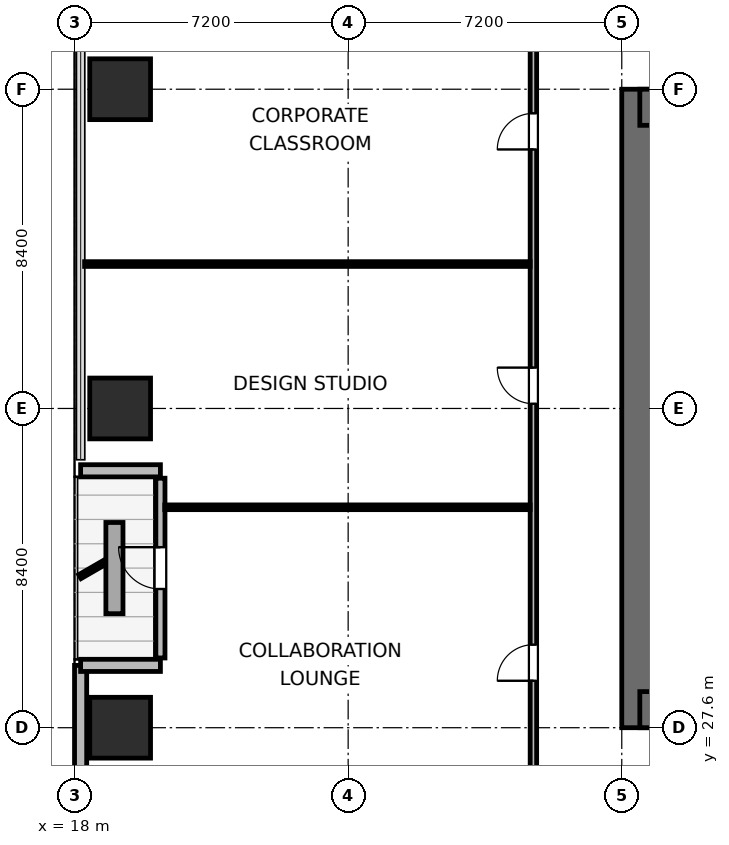
"""IFC4 building model, lengths in metres.
Left out: names, types, materials, properties, quantities, classifications, styles, units other than length and angle.
Written with IfcOpenShell. Run it as: python <this file> out.ifc"""

import sys

from ifc_helpers import new_model, si_unit, direction, frame, frame_2d, origin, origin_2d, place, context, subcontext, project, spatial, rectangle, extrude, element, fill, save


model = new_model("IFC4")
c1 = context("Model", 3, precision=1e-05, world=origin(), true_north=direction((0.0, 1.0)))
c2 = subcontext(c1, "Body", "Model", "MODEL_VIEW")
j1 = project(units=[si_unit("LENGTHUNIT", "METRE"), si_unit("PLANEANGLEUNIT", "RADIAN")], contexts=[c1])
p1 = place(None, origin())
s1 = spatial("IfcSite", under=j1, at=p1, CompositionType="ELEMENT")
p2 = place(p1, origin())
s2 = spatial("IfcBuilding", under=s1, at=p2, CompositionType="ELEMENT")
p3 = place(p2, frame((0.0, 0.0, 68.4)))
s3 = spatial("IfcBuildingStorey", under=s2, at=p3, CompositionType="ELEMENT", Elevation=68.4)
p4 = place(p3, frame((32.875, 27.6, 0.0), z_axis=(0.0, 0.0, 1.0), x_axis=(0.0, 1.0, 0.0)))
e1 = element("IfcWall", 1, at=p4, inside=s3, PredefinedType="SHEAR", context=c2, shape_type="SweptSolid", body=[
    extrude(rectangle(XDim=16.8, YDim=0.95, at=frame_2d((8.4, 0.0))), origin(), (0.0, 0.0, 1.0), 4.5),
])
p5 = place(p3, frame((32.875, 28.075, 0.0), z_axis=(0.0, 0.0, 1.0), x_axis=(1.0, 0.0, 0.0)))
e2 = element("IfcWall", 2, at=p5, inside=s3, PredefinedType="SHEAR", context=c2, shape_type="SweptSolid", body=[
    extrude(rectangle(XDim=9.05, YDim=0.95, at=frame_2d((4.525, 0.0))), origin(), (0.0, 0.0, 1.0), 4.5),
])
p6 = place(p5, frame((4.975, 0.0, 0.0)))
e3 = element("IfcOpeningElement", 3, at=p6, cuts=e2, PredefinedType="OPENING", context=c2, shape_type="SweptSolid", body=[
    extrude(rectangle(XDim=1.05, YDim=2.04, at=frame_2d((0.525, 1.02))), frame((0.0, 0.485, 0.0), z_axis=(0.0, -1.0, 0.0), x_axis=(1.0, 0.0, 0.0)), (0.0, 0.0, 1.0), 0.97),
])
p7 = place(p3, frame((32.875, 43.925, 0.0), z_axis=(0.0, 0.0, 1.0), x_axis=(1.0, 0.0, 0.0)))
e4 = element("IfcWall", 4, at=p7, inside=s3, PredefinedType="SHEAR", context=c2, shape_type="SweptSolid", body=[
    extrude(rectangle(XDim=9.05, YDim=0.95, at=frame_2d((4.525, 0.0))), origin(), (0.0, 0.0, 1.0), 4.5),
])
p8 = place(p7, frame((0.975, 0.0, 0.0)))
e5 = element("IfcOpeningElement", 5, at=p8, cuts=e4, PredefinedType="OPENING", context=c2, shape_type="SweptSolid", body=[
    extrude(rectangle(XDim=0.95, YDim=2.04, at=frame_2d((0.475, 1.02))), frame((0.0, 0.485, 0.0), z_axis=(0.0, -1.0, 0.0), x_axis=(1.0, 0.0, 0.0)), (0.0, 0.0, 1.0), 0.97),
])
p9 = place(p7, frame((4.225, 0.0, 0.0)))
e6 = element("IfcOpeningElement", 6, at=p9, cuts=e4, PredefinedType="OPENING", context=c2, shape_type="SweptSolid", body=[
    extrude(rectangle(XDim=0.9, YDim=2.02, at=frame_2d((0.45, 1.01))), frame((0.0, 0.485, 0.0), z_axis=(0.0, -1.0, 0.0), x_axis=(1.0, 0.0, 0.0)), (0.0, 0.0, 1.0), 0.97),
])
p10 = place(p7, frame((7.125, 0.0, 0.0)))
e7 = element("IfcOpeningElement", 7, at=p10, cuts=e4, PredefinedType="OPENING", context=c2, shape_type="SweptSolid", body=[
    extrude(rectangle(XDim=0.9, YDim=2.02, at=frame_2d((0.45, 1.01))), frame((0.0, 0.485, 0.0), z_axis=(0.0, -1.0, 0.0), x_axis=(1.0, 0.0, 0.0)), (0.0, 0.0, 1.0), 0.97),
])
for number, where, z_axis, x_axis in (
    (8, (19.2, 27.6, 0.0), (0.0, 0.0, 1.0), (1.0, 0.0, 0.0)),
    (9, (19.2, 36.0, 0.0), (0.0, 0.0, 1.0), (1.0, 0.0, 0.0)),
    (10, (19.2, 44.4, 0.0), (0.0, 0.0, 1.0), (1.0, 0.0, 0.0)),
):
    element("IfcColumn", number, at=place(p3, frame(where, z_axis=z_axis, x_axis=x_axis)), inside=s3, PredefinedType="COLUMN", context=c2, shape_type="SweptSolid", body=[
        extrude(rectangle(XDim=1.6, YDim=1.6, at=origin_2d()), origin(), (0.0, 0.0, 1.0), 4.5),
    ])
p11 = place(p3, frame((18.16, 15.021, 0.0), z_axis=(0.0, 0.0, 1.0), x_axis=(0.0, 1.0, 0.0)))
e11 = element("IfcWall", 11, at=p11, inside=s3, PredefinedType="SOLIDWALL", context=c2, shape_type="SweptSolid", body=[
    extrude(rectangle(XDim=14.219, YDim=0.32, at=frame_2d((7.109, 0.0))), origin(), (0.0, 0.0, 1.0), 4.24),
])
p12 = place(p3, frame((18.16, 29.24, 0.0), z_axis=(0.0, 0.0, 1.0), x_axis=(1.0, 0.0, 0.0)))
e12 = element("IfcWall", 12, at=p12, inside=s3, PredefinedType="SOLIDWALL", context=c2, shape_type="SweptSolid", body=[
    extrude(rectangle(XDim=2.1, YDim=0.32, at=frame_2d((1.05, 0.0))), origin(), (0.0, 0.0, 1.0), 3.475),
])
p13 = place(p3, frame((20.26, 29.435, 0.0), z_axis=(0.0, 0.0, 1.0), x_axis=(0.0, 1.0, 0.0)))
e13 = element("IfcWall", 13, at=p13, inside=s3, PredefinedType="SOLIDWALL", context=c2, shape_type="SweptSolid", body=[
    extrude(rectangle(XDim=4.73, YDim=0.24, at=frame_2d((2.365, 0.0))), origin(), (0.0, 0.0, 1.0), 3.762),
])
p14 = place(p13, frame((1.815, 0.0, 0.0)))
e14 = element("IfcOpeningElement", 14, at=p14, cuts=e13, PredefinedType="OPENING", context=c2, shape_type="SweptSolid", body=[
    extrude(rectangle(XDim=1.1, YDim=2.04, at=frame_2d((0.55, 1.02))), frame((0.0, 0.13, 0.0), z_axis=(0.0, -1.0, 0.0), x_axis=(1.0, 0.0, 0.0)), (0.0, 0.0, 1.0), 0.26),
])
p15 = place(p3, frame((20.26, 34.36, 0.0), z_axis=(0.0, 0.0, 1.0), x_axis=(-1.0, 0.0, 0.0)))
e15 = element("IfcWall", 15, at=p15, inside=s3, PredefinedType="SOLIDWALL", context=c2, shape_type="SweptSolid", body=[
    extrude(rectangle(XDim=2.1, YDim=0.32, at=frame_2d((1.05, 0.0))), origin(), (0.0, 0.0, 1.0), 3.475),
])
p16 = place(p3, frame((30.075, 25.307, 0.0), z_axis=(0.0, 0.0, 1.0), x_axis=(0.0, 1.0, 0.0)))
e16 = element("IfcWall", 16, at=p16, inside=s3, PredefinedType="PARTITIONING", context=c2, shape_type="SweptSolid", body=[
    extrude(rectangle(XDim=21.386, YDim=0.17, at=frame_2d((10.693, 0.0))), origin(), (0.0, 0.0, 1.0), 4.24),
])
p17 = place(p16, frame((3.528, 0.0, 0.0)))
e17 = element("IfcOpeningElement", 17, at=p17, cuts=e16, PredefinedType="OPENING", context=c2, shape_type="SweptSolid", body=[
    extrude(rectangle(XDim=0.95, YDim=2.04, at=frame_2d((0.475, 1.02))), frame((0.0, 0.095, 0.0), z_axis=(0.0, -1.0, 0.0), x_axis=(1.0, 0.0, 0.0)), (0.0, 0.0, 1.0), 0.19),
])
p18 = place(p16, frame((10.818, 0.0, 0.0)))
e18 = element("IfcOpeningElement", 18, at=p18, cuts=e16, PredefinedType="OPENING", context=c2, shape_type="SweptSolid", body=[
    extrude(rectangle(XDim=0.95, YDim=2.04, at=frame_2d((0.475, 1.02))), frame((0.0, 0.095, 0.0), z_axis=(0.0, -1.0, 0.0), x_axis=(1.0, 0.0, 0.0)), (0.0, 0.0, 1.0), 0.19),
])
p19 = place(p16, frame((17.508, 0.0, 0.0)))
e19 = element("IfcOpeningElement", 19, at=p19, cuts=e16, PredefinedType="OPENING", context=c2, shape_type="SweptSolid", body=[
    extrude(rectangle(XDim=0.95, YDim=2.04, at=frame_2d((0.475, 1.02))), frame((0.0, 0.095, 0.0), z_axis=(0.0, -1.0, 0.0), x_axis=(1.0, 0.0, 0.0)), (0.0, 0.0, 1.0), 0.19),
])
p20 = place(p3, frame((20.375, 33.4, 0.0), z_axis=(0.0, 0.0, 1.0), x_axis=(1.0, 0.0, 0.0)))
e20 = element("IfcWall", 20, at=p20, inside=s3, PredefinedType="PARTITIONING", context=c2, shape_type="SweptSolid", body=[
    extrude(rectangle(XDim=9.613, YDim=0.125, at=frame_2d((4.807, 0.0))), origin(), (0.0, 0.0, 1.0), 4.24),
])
p21 = place(p3, frame((18.265, 39.8, 0.0), z_axis=(0.0, 0.0, 1.0), x_axis=(1.0, 0.0, 0.0)))
e21 = element("IfcWall", 21, at=p21, inside=s3, PredefinedType="PARTITIONING", context=c2, shape_type="SweptSolid", body=[
    extrude(rectangle(XDim=11.723, YDim=0.125, at=frame_2d((5.862, 0.0))), origin(), (0.0, 0.0, 1.0), 4.24),
])
p22 = place(p14, origin())
e22 = element("IfcDoor", 22, at=p22, inside=s3, OperationType="SINGLE_SWING_RIGHT", PredefinedType="DOOR", context=c2, shape_type="SweptSolid", body=[
    extrude(rectangle(XDim=1.1, YDim=2.04, at=frame_2d((0.55, 1.02))), frame((0.0, 0.025, 0.0), z_axis=(0.0, -1.0, 0.0), x_axis=(1.0, 0.0, 0.0)), (0.0, 0.0, 1.0), 0.05),
])
fill(e14, e22)
p23 = place(p17, origin())
e23 = element("IfcDoor", 23, at=p23, inside=s3, OperationType="SINGLE_SWING_LEFT", PredefinedType="DOOR", context=c2, shape_type="SweptSolid", body=[
    extrude(rectangle(XDim=0.95, YDim=2.04, at=frame_2d((0.475, 1.02))), frame((0.0, 0.025, 0.0), z_axis=(0.0, -1.0, 0.0), x_axis=(1.0, 0.0, 0.0)), (0.0, 0.0, 1.0), 0.05),
])
fill(e17, e23)
p24 = place(p18, origin())
e24 = element("IfcDoor", 24, at=p24, inside=s3, OperationType="SINGLE_SWING_RIGHT", PredefinedType="DOOR", context=c2, shape_type="SweptSolid", body=[
    extrude(rectangle(XDim=0.95, YDim=2.04, at=frame_2d((0.475, 1.02))), frame((0.0, 0.025, 0.0), z_axis=(0.0, -1.0, 0.0), x_axis=(1.0, 0.0, 0.0)), (0.0, 0.0, 1.0), 0.05),
])
fill(e18, e24)
p25 = place(p19, origin())
e25 = element("IfcDoor", 25, at=p25, inside=s3, OperationType="SINGLE_SWING_LEFT", PredefinedType="DOOR", context=c2, shape_type="SweptSolid", body=[
    extrude(rectangle(XDim=0.95, YDim=2.04, at=frame_2d((0.475, 1.02))), frame((0.0, 0.025, 0.0), z_axis=(0.0, -1.0, 0.0), x_axis=(1.0, 0.0, 0.0)), (0.0, 0.0, 1.0), 0.05),
])
fill(e19, e25)
save(model, sys.argv[1])
